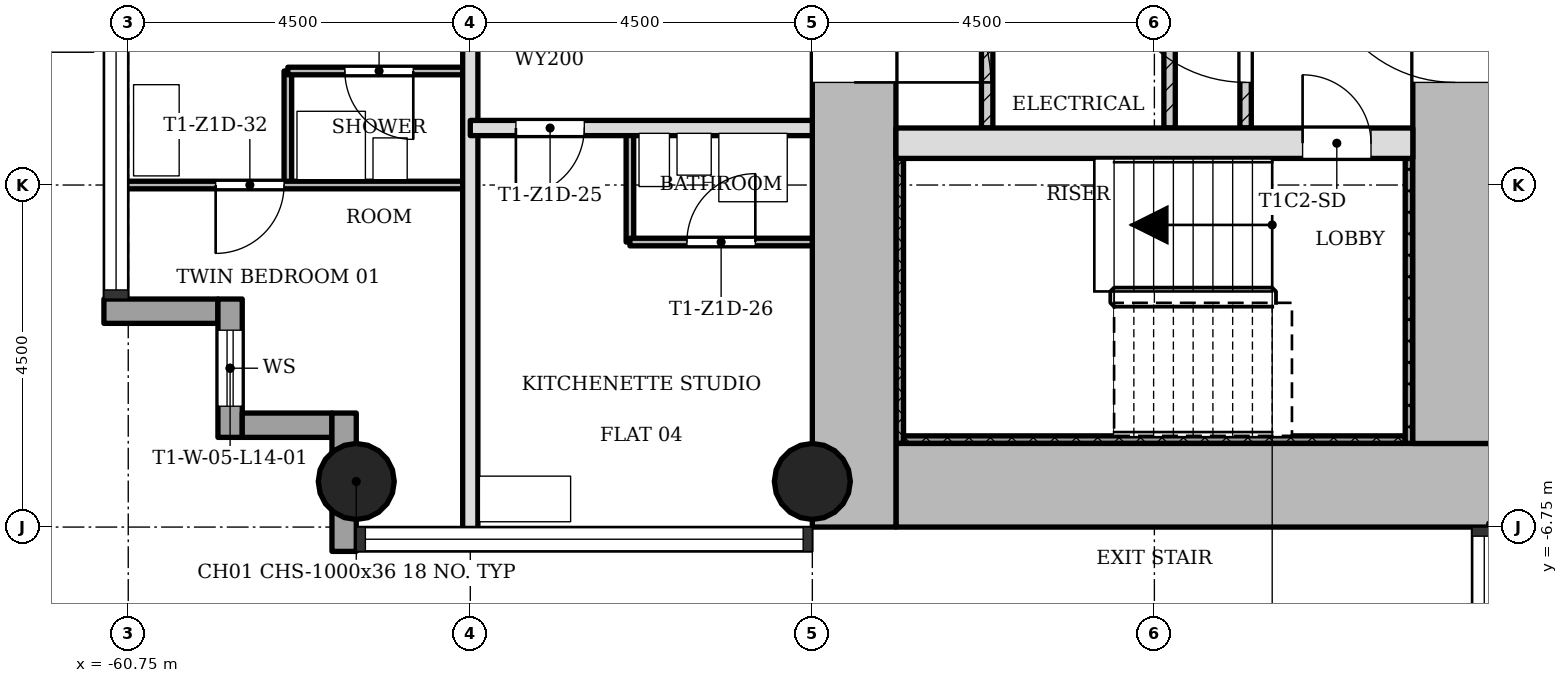
"""IFC4 building model, lengths in metres.
Left out: names, types, materials, properties, quantities, classifications, styles, units other than length and angle.
Written with IfcOpenShell. Run it as: python <this file> out.ifc"""

import sys

from ifc_helpers import new_model, si_unit, direction, frame, frame_2d, origin, origin_2d, place, context, subcontext, project, spatial, rectangle, hollow_circle, extrude, element, fill, save


model = new_model("IFC4")
c1 = context("Model", 3, precision=1e-05, world=origin(), true_north=direction((0.0, 1.0)))
c2 = subcontext(c1, "Body", "Model", "MODEL_VIEW")
j1 = project(units=[si_unit("LENGTHUNIT", "METRE"), si_unit("PLANEANGLEUNIT", "RADIAN")], contexts=[c1])
p1 = place(None, origin())
s1 = spatial("IfcSite", under=j1, at=p1, CompositionType="ELEMENT")
p2 = place(p1, origin())
s2 = spatial("IfcBuilding", under=s1, at=p2, CompositionType="ELEMENT")
p3 = place(p2, frame((0.0, 0.0, 55.1)))
s3 = spatial("IfcBuildingStorey", under=s2, at=p3, CompositionType="ELEMENT", Elevation=55.1)
p4 = place(p3, frame((-50.65, -6.2, 0.0), z_axis=(0.0, 0.0, 1.0), x_axis=(1.0, 0.0, 0.0)))
e1 = element("IfcWall", 1, at=p4, inside=s3, PredefinedType="SHEAR", context=c2, shape_type="SweptSolid", body=[
    extrude(rectangle(XDim=7.998, YDim=1.1, at=frame_2d((3.999, 0.0))), origin(), (0.0, 0.0, 1.0), 3.4),
])
p5 = place(p3, frame((-43.3, -5.65, 0.0), z_axis=(0.0, 0.0, 1.0), x_axis=(0.0, 1.0, 0.0)))
e2 = element("IfcWall", 2, at=p5, inside=s3, PredefinedType="SHEAR", context=c2, shape_type="SweptSolid", body=[
    extrude(rectangle(XDim=12.4, YDim=1.1, at=frame_2d((6.2, 0.0))), origin(), (0.0, 0.0, 1.0), 3.4),
])
p6 = place(p5, frame((4.75, 0.0, 0.0)))
e3 = element("IfcOpeningElement", 3, at=p6, cuts=e2, PredefinedType="OPENING", context=c2, shape_type="SweptSolid", body=[
    extrude(rectangle(XDim=1.8, YDim=2.1, at=frame_2d((0.9, 1.05))), frame((0.0, 0.56, 0.0), z_axis=(0.0, -1.0, 0.0), x_axis=(1.0, 0.0, 0.0)), (0.0, 0.0, 1.0), 1.12),
])
p7 = place(p3, frame((-51.2, 5.65, 0.0), z_axis=(0.0, 0.0, 1.0), x_axis=(0.0, -1.0, 0.0)))
e4 = element("IfcWall", 4, at=p7, inside=s3, PredefinedType="SHEAR", context=c2, shape_type="SweptSolid", body=[
    extrude(rectangle(XDim=12.4, YDim=1.1, at=frame_2d((6.2, 0.0))), origin(), (0.0, 0.0, 1.0), 3.4),
])
p8 = place(p7, frame((4.75, 0.0, 0.0)))
e5 = element("IfcOpeningElement", 5, at=p8, cuts=e4, PredefinedType="OPENING", context=c2, shape_type="SweptSolid", body=[
    extrude(rectangle(XDim=1.8, YDim=2.1, at=frame_2d((0.9, 1.05))), frame((0.0, 0.56, 0.0), z_axis=(0.0, -1.0, 0.0), x_axis=(1.0, 0.0, 0.0)), (0.0, 0.0, 1.0), 1.12),
])
p9 = place(p3, frame((-50.65, -1.7, 0.0), z_axis=(0.0, 0.0, 1.0), x_axis=(1.0, 0.0, 0.0)))
e6 = element("IfcWall", 6, at=p9, inside=s3, PredefinedType="SHEAR", context=c2, shape_type="SweptSolid", body=[
    extrude(rectangle(XDim=6.8, YDim=0.4, at=frame_2d((3.4, 0.0))), origin(), (0.0, 0.0, 1.0), 3.4),
])
p10 = place(p9, frame((5.35, 0.0, 0.0)))
e7 = element("IfcOpeningElement", 7, at=p10, cuts=e6, PredefinedType="OPENING", context=c2, shape_type="SweptSolid", body=[
    extrude(rectangle(XDim=0.9, YDim=2.1, at=frame_2d((0.45, 1.05))), frame((0.0, 0.21, 0.0), z_axis=(0.0, -1.0, 0.0), x_axis=(1.0, 0.0, 0.0)), (0.0, 0.0, 1.0), 0.42),
])
for number, where, z_axis, x_axis in (
    (8, (-51.75, -6.15, 0.0), (0.0, 0.0, 1.0), (1.0, 0.0, 0.0)),
    (9, (-57.75, -6.15, 0.0), (0.0, 0.0, 1.0), (1.0, 0.0, 0.0)),
):
    element("IfcColumn", number, at=place(p3, frame(where, z_axis=z_axis, x_axis=x_axis)), inside=s3, PredefinedType="COLUMN", context=c2, shape_type="SweptSolid", body=[
        extrude(hollow_circle(Radius=0.5, WallThickness=0.036, at=origin_2d()), origin(), (0.0, 0.0, 1.0), 3.4),
    ])
p11 = place(p3, frame((-61.07, -3.91, -0.3), z_axis=(0.0, 0.0, 1.0), x_axis=(1.0, 0.0, 0.0)))
e10 = element("IfcWall", 10, at=p11, inside=s3, PredefinedType="STANDARD", context=c2, shape_type="SweptSolid", body=[
    extrude(rectangle(XDim=1.5, YDim=0.32, at=frame_2d((0.75, 0.0))), origin(), (0.0, 0.0, 1.0), 3.4),
])
p12 = place(p3, frame((-59.41, -3.75, -0.3), z_axis=(0.0, 0.0, 1.0), x_axis=(0.0, -1.0, 0.0)))
e11 = element("IfcWall", 11, at=p12, inside=s3, PredefinedType="STANDARD", context=c2, shape_type="SweptSolid", body=[
    extrude(rectangle(XDim=1.82, YDim=0.32, at=frame_2d((0.91, 0.0))), origin(), (0.0, 0.0, 1.0), 3.4),
])
p13 = place(p12, frame((0.41, 0.0, 1.2)))
e12 = element("IfcOpeningElement", 12, at=p13, cuts=e11, PredefinedType="OPENING", context=c2, shape_type="SweptSolid", body=[
    extrude(rectangle(XDim=1.0, YDim=1.5, at=frame_2d((0.5, 0.75))), frame((0.0, 0.17, 0.0), z_axis=(0.0, -1.0, 0.0), x_axis=(1.0, 0.0, 0.0)), (0.0, 0.0, 1.0), 0.34),
])
p14 = place(p3, frame((-59.25, -5.41, -0.3), z_axis=(0.0, 0.0, 1.0), x_axis=(1.0, 0.0, 0.0)))
e13 = element("IfcWall", 13, at=p14, inside=s3, PredefinedType="STANDARD", context=c2, shape_type="SweptSolid", body=[
    extrude(rectangle(XDim=1.18, YDim=0.32, at=frame_2d((0.59, 0.0))), origin(), (0.0, 0.0, 1.0), 3.4),
])
p15 = place(p3, frame((-57.91, -5.25, -0.3), z_axis=(0.0, 0.0, 1.0), x_axis=(0.0, -1.0, 0.0)))
e14 = element("IfcWall", 14, at=p15, inside=s3, PredefinedType="STANDARD", context=c2, shape_type="SweptSolid", body=[
    extrude(rectangle(XDim=1.82, YDim=0.32, at=frame_2d((0.91, 0.0))), origin(), (0.0, 0.0, 1.0), 3.4),
])
p16 = place(p3, frame((-46.05, 1.5, 0.0), z_axis=(0.0, 0.0, 1.0), x_axis=(0.0, -1.0, 0.0)))
e15 = element("IfcWall", 15, at=p16, inside=s3, PredefinedType="PARTITIONING", context=c2, shape_type="SweptSolid", body=[
    extrude(rectangle(XDim=3.0, YDim=0.15, at=frame_2d((1.5, 0.0))), origin(), (0.0, 0.0, 1.0), 3.0),
])
p17 = place(p16, frame((0.6, 0.0, 0.0)))
e16 = element("IfcOpeningElement", 16, at=p17, cuts=e15, PredefinedType="OPENING", context=c2, shape_type="SweptSolid", body=[
    extrude(rectangle(XDim=1.8, YDim=2.1, at=frame_2d((0.9, 1.05))), frame((0.0, 0.085, 0.0), z_axis=(0.0, -1.0, 0.0), x_axis=(1.0, 0.0, 0.0)), (0.0, 0.0, 1.0), 0.17),
])
for number, where, z_axis, x_axis in (
    (17, (-47.05, -0.3, 0.0), (0.0, 0.0, 1.0), (0.0, -1.0, 0.0)),
    (18, (-49.45, -0.3, 0.0), (0.0, 0.0, 1.0), (0.0, -1.0, 0.0)),
):
    element("IfcWall", number, at=place(p3, frame(where, z_axis=z_axis, x_axis=x_axis)), inside=s3, PredefinedType="PARTITIONING", context=c2, shape_type="SweptSolid", body=[
        extrude(rectangle(XDim=1.2, YDim=0.15, at=frame_2d((0.6, 0.0))), origin(), (0.0, 0.0, 1.0), 3.0),
    ])
p18 = place(p3, frame((-58.65, -2.25, 0.0), z_axis=(0.0, 0.0, 1.0), x_axis=(0.0, 1.0, 0.0)))
e19 = element("IfcWall", 19, at=p18, inside=s3, PredefinedType="PARTITIONING", context=c2, shape_type="SweptSolid", body=[
    extrude(rectangle(XDim=1.5, YDim=0.1, at=frame_2d((0.75, 0.0))), origin(), (0.0, 0.0, 1.0), 3.0),
])
p19 = place(p3, frame((-56.25, -6.85, 0.0), z_axis=(0.0, 0.0, 1.0), x_axis=(0.0, 1.0, 0.0)))
e20 = element("IfcWall", 20, at=p19, inside=s3, PredefinedType="SOLIDWALL", context=c2, shape_type="SweptSolid", body=[
    extrude(rectangle(XDim=13.7, YDim=0.2, at=frame_2d((6.85, 0.0))), origin(), (0.0, 0.0, 1.0), 3.0),
])
p20 = place(p19, frame((6.4, 0.0, 0.0)))
e21 = element("IfcOpeningElement", 21, at=p20, cuts=e20, PredefinedType="OPENING", context=c2, shape_type="SweptSolid", body=[
    extrude(rectangle(XDim=0.9, YDim=2.1, at=frame_2d((0.45, 1.05))), frame((0.0, 0.11, 0.0), z_axis=(0.0, -1.0, 0.0), x_axis=(1.0, 0.0, 0.0)), (0.0, 0.0, 1.0), 0.22),
])
p21 = place(p3, frame((-54.15, -3.0, 0.0), z_axis=(0.0, 0.0, 1.0), x_axis=(0.0, 1.0, 0.0)))
e22 = element("IfcWall", 22, at=p21, inside=s3, PredefinedType="PARTITIONING", context=c2, shape_type="SweptSolid", body=[
    extrude(rectangle(XDim=1.5, YDim=0.1, at=frame_2d((0.75, 0.0))), origin(), (0.0, 0.0, 1.0), 3.0),
])
p22 = place(p3, frame((-54.15, -3.0, 0.0), z_axis=(0.0, 0.0, 1.0), x_axis=(1.0, 0.0, 0.0)))
e23 = element("IfcWall", 23, at=p22, inside=s3, PredefinedType="PARTITIONING", context=c2, shape_type="SweptSolid", body=[
    extrude(rectangle(XDim=2.4, YDim=0.1, at=frame_2d((1.2, 0.0))), origin(), (0.0, 0.0, 1.0), 3.0),
])
p23 = place(p22, frame((0.75, 0.0, 0.0)))
e24 = element("IfcOpeningElement", 24, at=p23, cuts=e23, PredefinedType="OPENING", context=c2, shape_type="SweptSolid", body=[
    extrude(rectangle(XDim=0.9, YDim=2.1, at=frame_2d((0.45, 1.05))), frame((0.0, 0.06, 0.0), z_axis=(0.0, -1.0, 0.0), x_axis=(1.0, 0.0, 0.0)), (0.0, 0.0, 1.0), 0.12),
])
p24 = place(p3, frame((-60.85, -2.25, 0.0), z_axis=(0.0, 0.0, 1.0), x_axis=(1.0, 0.0, 0.0)))
e25 = element("IfcWall", 25, at=p24, inside=s3, PredefinedType="PARTITIONING", context=c2, shape_type="SweptSolid", body=[
    extrude(rectangle(XDim=4.6, YDim=0.1, at=frame_2d((2.3, 0.0))), origin(), (0.0, 0.0, 1.0), 3.0),
])
p25 = place(p24, frame((1.25, 0.0, 0.0)))
e26 = element("IfcOpeningElement", 26, at=p25, cuts=e25, PredefinedType="OPENING", context=c2, shape_type="SweptSolid", body=[
    extrude(rectangle(XDim=0.9, YDim=2.1, at=frame_2d((0.45, 1.05))), frame((0.0, 0.06, 0.0), z_axis=(0.0, -1.0, 0.0), x_axis=(1.0, 0.0, 0.0)), (0.0, 0.0, 1.0), 0.12),
])
p26 = place(p3, frame((-56.25, -1.5, 0.0), z_axis=(0.0, 0.0, 1.0), x_axis=(1.0, 0.0, 0.0)))
e27 = element("IfcWall", 27, at=p26, inside=s3, PredefinedType="SOLIDWALL", context=c2, shape_type="SweptSolid", body=[
    extrude(rectangle(XDim=4.5, YDim=0.2, at=frame_2d((2.25, 0.0))), origin(), (0.0, 0.0, 1.0), 3.0),
])
p27 = place(p26, frame((0.6, 0.0, 0.0)))
e28 = element("IfcOpeningElement", 28, at=p27, cuts=e27, PredefinedType="OPENING", context=c2, shape_type="SweptSolid", body=[
    extrude(rectangle(XDim=0.9, YDim=2.1, at=frame_2d((0.45, 1.05))), frame((0.0, 0.11, 0.0), z_axis=(0.0, -1.0, 0.0), x_axis=(1.0, 0.0, 0.0)), (0.0, 0.0, 1.0), 0.22),
])
p28 = place(p3, frame((-58.65, -0.75, 0.0), z_axis=(0.0, 0.0, 1.0), x_axis=(1.0, 0.0, 0.0)))
e29 = element("IfcWall", 29, at=p28, inside=s3, PredefinedType="PARTITIONING", context=c2, shape_type="SweptSolid", body=[
    extrude(rectangle(XDim=2.4, YDim=0.1, at=frame_2d((1.2, 0.0))), origin(), (0.0, 0.0, 1.0), 3.0),
])
p29 = place(p28, frame((0.75, 0.0, 0.0)))
e30 = element("IfcOpeningElement", 30, at=p29, cuts=e29, PredefinedType="OPENING", context=c2, shape_type="SweptSolid", body=[
    extrude(rectangle(XDim=0.9, YDim=2.1, at=frame_2d((0.45, 1.05))), frame((0.0, 0.06, 0.0), z_axis=(0.0, -1.0, 0.0), x_axis=(1.0, 0.0, 0.0)), (0.0, 0.0, 1.0), 0.12),
])
p30 = place(p3, frame((-50.6, -1.9, 0.0), z_axis=(0.0, 0.0, 1.0), x_axis=(0.0, -1.0, 0.0)))
e31 = element("IfcWall", 31, at=p30, inside=s3, PredefinedType="SHEAR", context=c2, shape_type="SweptSolid", body=[
    extrude(rectangle(XDim=3.75, YDim=0.1, at=frame_2d((1.875, 0.0))), origin(), (0.0, 0.0, 1.0), 3.4),
])
p31 = place(p3, frame((-43.95, -5.6, 0.0), z_axis=(0.0, 0.0, 1.0), x_axis=(-1.0, 0.0, 0.0)))
e32 = element("IfcWall", 32, at=p31, inside=s3, PredefinedType="SHEAR", context=c2, shape_type="SweptSolid", body=[
    extrude(rectangle(XDim=6.6, YDim=0.1, at=frame_2d((3.3, 0.0))), origin(), (0.0, 0.0, 1.0), 3.4),
])
p32 = place(p3, frame((-43.9, -1.9, 0.0), z_axis=(0.0, 0.0, 1.0), x_axis=(0.0, -1.0, 0.0)))
e33 = element("IfcWall", 33, at=p32, inside=s3, PredefinedType="SHEAR", context=c2, shape_type="SweptSolid", body=[
    extrude(rectangle(XDim=3.75, YDim=0.1, at=frame_2d((1.875, 0.0))), origin(), (0.0, 0.0, 1.0), 3.4),
])
p33 = place(p17, origin())
e34 = element("IfcDoor", 34, at=p33, inside=s3, OperationType="SINGLE_SWING_LEFT", PredefinedType="DOOR", context=c2, shape_type="SweptSolid", body=[
    extrude(rectangle(XDim=1.8, YDim=2.1, at=frame_2d((0.9, 1.05))), frame((0.0, 0.025, 0.0), z_axis=(0.0, -1.0, 0.0), x_axis=(1.0, 0.0, 0.0)), (0.0, 0.0, 1.0), 0.05),
])
fill(e16, e34)
p34 = place(p27, origin())
e35 = element("IfcDoor", 35, at=p34, inside=s3, OperationType="SINGLE_SWING_LEFT", PredefinedType="DOOR", context=c2, shape_type="SweptSolid", body=[
    extrude(rectangle(XDim=0.9, YDim=2.1, at=frame_2d((0.45, 1.05))), frame((0.0, 0.025, 0.0), z_axis=(0.0, -1.0, 0.0), x_axis=(1.0, 0.0, 0.0)), (0.0, 0.0, 1.0), 0.05),
])
fill(e28, e35)
p35 = place(p23, origin())
e36 = element("IfcDoor", 36, at=p35, inside=s3, OperationType="SINGLE_SWING_LEFT", PredefinedType="DOOR", context=c2, shape_type="SweptSolid", body=[
    extrude(rectangle(XDim=0.9, YDim=2.1, at=frame_2d((0.45, 1.05))), frame((0.0, 0.025, 0.0), z_axis=(0.0, -1.0, 0.0), x_axis=(1.0, 0.0, 0.0)), (0.0, 0.0, 1.0), 0.05),
])
fill(e24, e36)
p36 = place(p29, origin())
e37 = element("IfcDoor", 37, at=p36, inside=s3, OperationType="SINGLE_SWING_RIGHT", PredefinedType="DOOR", context=c2, shape_type="SweptSolid", body=[
    extrude(rectangle(XDim=0.9, YDim=2.1, at=frame_2d((0.45, 1.05))), frame((0.0, 0.025, 0.0), z_axis=(0.0, -1.0, 0.0), x_axis=(1.0, 0.0, 0.0)), (0.0, 0.0, 1.0), 0.05),
])
fill(e30, e37)
p37 = place(p25, origin())
e38 = element("IfcDoor", 38, at=p37, inside=s3, OperationType="SINGLE_SWING_LEFT", PredefinedType="DOOR", context=c2, shape_type="SweptSolid", body=[
    extrude(rectangle(XDim=0.9, YDim=2.1, at=frame_2d((0.45, 1.05))), frame((0.0, 0.025, 0.0), z_axis=(0.0, -1.0, 0.0), x_axis=(1.0, 0.0, 0.0)), (0.0, 0.0, 1.0), 0.05),
])
fill(e26, e38)
p38 = place(p10, origin())
e39 = element("IfcDoor", 39, at=p38, inside=s3, OperationType="SINGLE_SWING_RIGHT", PredefinedType="DOOR", context=c2, shape_type="SweptSolid", body=[
    extrude(rectangle(XDim=0.9, YDim=2.1, at=frame_2d((0.45, 1.05))), frame((0.0, 0.025, 0.0), z_axis=(0.0, -1.0, 0.0), x_axis=(1.0, 0.0, 0.0)), (0.0, 0.0, 1.0), 0.05),
])
fill(e7, e39)
p39 = place(p6, origin())
e40 = element("IfcDoor", 40, at=p39, inside=s3, OperationType="SINGLE_SWING_LEFT", PredefinedType="DOOR", context=c2, shape_type="SweptSolid", body=[
    extrude(rectangle(XDim=1.8, YDim=2.1, at=frame_2d((0.9, 1.05))), frame((0.0, 0.025, 0.0), z_axis=(0.0, -1.0, 0.0), x_axis=(1.0, 0.0, 0.0)), (0.0, 0.0, 1.0), 0.05),
])
fill(e3, e40)
p40 = place(p8, origin())
e41 = element("IfcDoor", 41, at=p40, inside=s3, OperationType="SINGLE_SWING_LEFT", PredefinedType="DOOR", context=c2, shape_type="SweptSolid", body=[
    extrude(rectangle(XDim=1.8, YDim=2.1, at=frame_2d((0.9, 1.05))), frame((0.0, 0.025, 0.0), z_axis=(0.0, -1.0, 0.0), x_axis=(1.0, 0.0, 0.0)), (0.0, 0.0, 1.0), 0.05),
])
fill(e5, e41)
p41 = place(p13, origin())
e42 = element("IfcWindow", 42, at=p41, inside=s3, PartitioningType="SINGLE_PANEL", PredefinedType="WINDOW", context=c2, shape_type="SweptSolid", body=[
    extrude(rectangle(XDim=1.0, YDim=1.5, at=frame_2d((0.5, 0.75))), frame((0.0, 0.03, 0.0), z_axis=(0.0, -1.0, 0.0), x_axis=(1.0, 0.0, 0.0)), (0.0, 0.0, 1.0), 0.06),
])
fill(e12, e42)
save(model, sys.argv[1])
